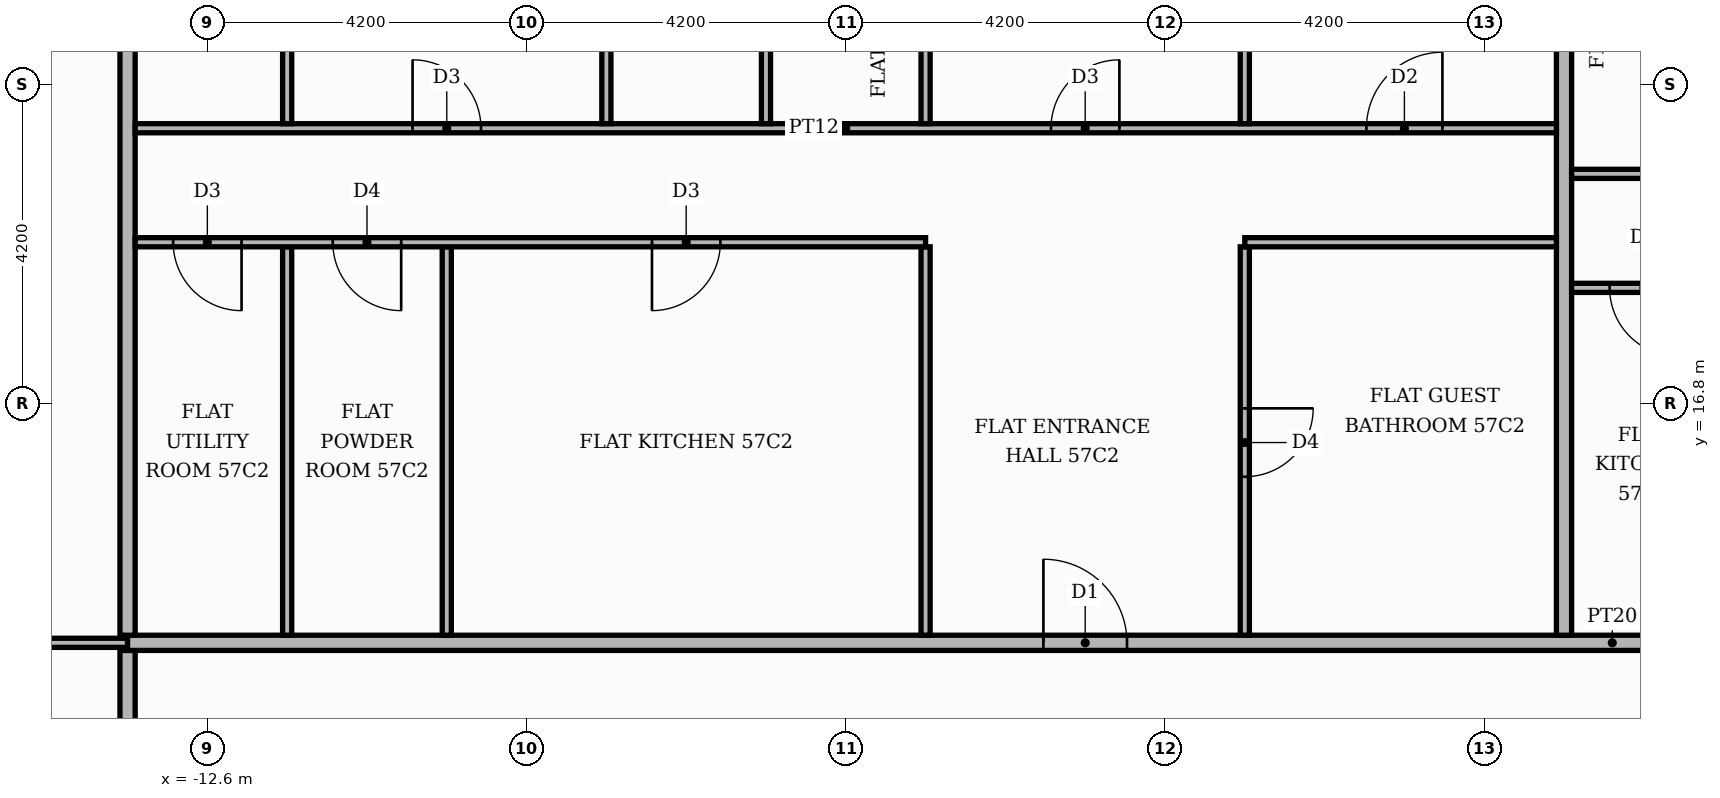
"""IFC4 building model, lengths in metres.
Left out: names, types, materials, properties, quantities, classifications, styles, units other than length and angle.
Written with IfcOpenShell. Run it as: python <this file> out.ifc"""

import sys

from ifc_helpers import new_model, si_unit, direction, frame, frame_2d, origin, place, context, subcontext, project, spatial, rectangle, extrude, element, fill, save


model = new_model("IFC4")
c1 = context("Model", 3, precision=1e-05, world=origin(), true_north=direction((0.0, 1.0)))
c2 = subcontext(c1, "Body", "Model", "MODEL_VIEW")
j1 = project(units=[si_unit("LENGTHUNIT", "METRE"), si_unit("PLANEANGLEUNIT", "RADIAN")], contexts=[c1])
p1 = place(None, origin())
s1 = spatial("IfcSite", under=j1, at=p1, CompositionType="ELEMENT")
p2 = place(p1, origin())
s2 = spatial("IfcBuilding", under=s1, at=p2, CompositionType="ELEMENT")
p3 = place(p2, frame((0.0, 0.0, 240.6)))
s3 = spatial("IfcBuildingStorey", under=s2, at=p3, CompositionType="ELEMENT", Elevation=240.6)
p4 = place(p3, frame((-13.65, 11.1, 0.0), z_axis=(0.0, 0.0, 1.0), x_axis=(0.0, 1.0, 0.0)))
e1 = element("IfcWall", 1, at=p4, inside=s3, PredefinedType="PARTITIONING", context=c2, shape_type="SweptSolid", body=[
    extrude(rectangle(XDim=2.45, YDim=0.2, at=frame_2d((1.225, 0.0))), origin(), (0.0, 0.0, 1.0), 3.48),
])
p5 = place(p3, frame((-19.82, 13.65, 0.0), z_axis=(0.0, 0.0, 1.0), x_axis=(1.0, 0.0, 0.0)))
e2 = element("IfcWall", 2, at=p5, inside=s3, PredefinedType="PARTITIONING", context=c2, shape_type="SweptSolid", body=[
    extrude(rectangle(XDim=6.17, YDim=0.12, at=frame_2d((3.085, 0.0))), origin(), (0.0, 0.0, 1.0), 3.48),
])
p6 = place(p5, frame((2.635, 0.0, 0.0)))
e3 = element("IfcOpeningElement", 3, at=p6, cuts=e2, PredefinedType="OPENING", context=c2, shape_type="SweptSolid", body=[
    extrude(rectangle(XDim=0.9, YDim=2.1, at=frame_2d((0.45, 1.05))), frame((0.0, 0.07, 0.0), z_axis=(0.0, -1.0, 0.0), x_axis=(1.0, 0.0, 0.0)), (0.0, 0.0, 1.0), 0.14),
])
p7 = place(p3, frame((-13.65, 13.65, 0.0), z_axis=(0.0, 0.0, 1.0), x_axis=(1.0, 0.0, 0.0)))
e4 = element("IfcWall", 4, at=p7, inside=s3, PredefinedType="PARTITIONING", context=c2, shape_type="SweptSolid", body=[
    extrude(rectangle(XDim=39.07, YDim=0.2, at=frame_2d((19.535, 0.0))), origin(), (0.0, 0.0, 1.0), 3.48),
])
p8 = place(p7, frame((24.65, 0.0, 0.0)))
e5 = element("IfcOpeningElement", 5, at=p8, cuts=e4, PredefinedType="OPENING", context=c2, shape_type="SweptSolid", body=[
    extrude(rectangle(XDim=1.1, YDim=2.4, at=frame_2d((0.55, 1.2))), frame((0.0, 0.11, 0.0), z_axis=(0.0, -1.0, 0.0), x_axis=(1.0, 0.0, 0.0)), (0.0, 0.0, 1.0), 0.22),
])
p9 = place(p7, frame((12.05, 0.0, 0.0)))
e6 = element("IfcOpeningElement", 6, at=p9, cuts=e4, PredefinedType="OPENING", context=c2, shape_type="SweptSolid", body=[
    extrude(rectangle(XDim=1.1, YDim=2.4, at=frame_2d((0.55, 1.2))), frame((0.0, 0.11, 0.0), z_axis=(0.0, -1.0, 0.0), x_axis=(1.0, 0.0, 0.0)), (0.0, 0.0, 1.0), 0.22),
])
p10 = place(p3, frame((-13.65, 13.75, 0.0), z_axis=(0.0, 0.0, 1.0), x_axis=(0.0, 1.0, 0.0)))
e7 = element("IfcWall", 7, at=p10, inside=s3, PredefinedType="PARTITIONING", context=c2, shape_type="SweptSolid", body=[
    extrude(rectangle(XDim=11.67, YDim=0.2, at=frame_2d((5.835, 0.0))), origin(), (0.0, 0.0, 1.0), 3.48),
])
for number, where, z_axis, x_axis in (
    (8, (-11.55, 13.75, 0.0), (0.0, 0.0, 1.0), (0.0, 1.0, 0.0)),
    (9, (-9.45, 13.75, 0.0), (0.0, 0.0, 1.0), (0.0, 1.0, 0.0)),
    (10, (-3.15, 13.75, 0.0), (0.0, 0.0, 1.0), (0.0, 1.0, 0.0)),
):
    element("IfcWall", number, at=place(p3, frame(where, z_axis=z_axis, x_axis=x_axis)), inside=s3, PredefinedType="PARTITIONING", context=c2, shape_type="SweptSolid", body=[
        extrude(rectangle(XDim=5.11, YDim=0.12, at=frame_2d((2.555, 0.0))), origin(), (0.0, 0.0, 1.0), 3.48),
    ])
p11 = place(p3, frame((1.05, 13.75, 0.0), z_axis=(0.0, 0.0, 1.0), x_axis=(0.0, 1.0, 0.0)))
e11 = element("IfcWall", 11, at=p11, inside=s3, PredefinedType="PARTITIONING", context=c2, shape_type="SweptSolid", body=[
    extrude(rectangle(XDim=5.11, YDim=0.12, at=frame_2d((2.555, 0.0))), origin(), (0.0, 0.0, 1.0), 3.48),
])
p12 = place(p11, frame((2.085, 0.0, 0.0)))
e12 = element("IfcOpeningElement", 12, at=p12, cuts=e11, PredefinedType="OPENING", context=c2, shape_type="SweptSolid", body=[
    extrude(rectangle(XDim=0.9, YDim=2.1, at=frame_2d((0.45, 1.05))), frame((0.0, 0.07, 0.0), z_axis=(0.0, -1.0, 0.0), x_axis=(1.0, 0.0, 0.0)), (0.0, 0.0, 1.0), 0.14),
])
p13 = place(p3, frame((5.25, 13.75, 0.0), z_axis=(0.0, 0.0, 1.0), x_axis=(0.0, 1.0, 0.0)))
e13 = element("IfcWall", 13, at=p13, inside=s3, PredefinedType="PARTITIONING", context=c2, shape_type="SweptSolid", body=[
    extrude(rectangle(XDim=11.67, YDim=0.2, at=frame_2d((5.835, 0.0))), origin(), (0.0, 0.0, 1.0), 3.48),
])
p14 = place(p3, frame((5.35, 18.32, 0.0), z_axis=(0.0, 0.0, 1.0), x_axis=(1.0, 0.0, 0.0)))
e14 = element("IfcWall", 14, at=p14, inside=s3, PredefinedType="PARTITIONING", context=c2, shape_type="SweptSolid", body=[
    extrude(rectangle(XDim=4.1, YDim=0.12, at=frame_2d((2.05, 0.0))), origin(), (0.0, 0.0, 1.0), 3.48),
])
p15 = place(p14, frame((0.5, 0.0, 0.0)))
e15 = element("IfcOpeningElement", 15, at=p15, cuts=e14, PredefinedType="OPENING", context=c2, shape_type="SweptSolid", body=[
    extrude(rectangle(XDim=0.9, YDim=2.1, at=frame_2d((0.45, 1.05))), frame((0.0, 0.07, 0.0), z_axis=(0.0, -1.0, 0.0), x_axis=(1.0, 0.0, 0.0)), (0.0, 0.0, 1.0), 0.14),
])
p16 = place(p3, frame((-13.55, 18.92, 0.0), z_axis=(0.0, 0.0, 1.0), x_axis=(1.0, 0.0, 0.0)))
e16 = element("IfcWall", 16, at=p16, inside=s3, PredefinedType="PARTITIONING", context=c2, shape_type="SweptSolid", body=[
    extrude(rectangle(XDim=10.4, YDim=0.12, at=frame_2d((5.2, 0.0))), origin(), (0.0, 0.0, 1.0), 3.48),
])
p17 = place(p16, frame((6.8, 0.0, 0.0)))
e17 = element("IfcOpeningElement", 17, at=p17, cuts=e16, PredefinedType="OPENING", context=c2, shape_type="SweptSolid", body=[
    extrude(rectangle(XDim=0.9, YDim=2.1, at=frame_2d((0.45, 1.05))), frame((0.0, 0.07, 0.0), z_axis=(0.0, -1.0, 0.0), x_axis=(1.0, 0.0, 0.0)), (0.0, 0.0, 1.0), 0.14),
])
p18 = place(p16, frame((2.6, 0.0, 0.0)))
e18 = element("IfcOpeningElement", 18, at=p18, cuts=e16, PredefinedType="OPENING", context=c2, shape_type="SweptSolid", body=[
    extrude(rectangle(XDim=0.9, YDim=2.1, at=frame_2d((0.45, 1.05))), frame((0.0, 0.07, 0.0), z_axis=(0.0, -1.0, 0.0), x_axis=(1.0, 0.0, 0.0)), (0.0, 0.0, 1.0), 0.14),
])
p19 = place(p16, frame((0.5, 0.0, 0.0)))
e19 = element("IfcOpeningElement", 19, at=p19, cuts=e16, PredefinedType="OPENING", context=c2, shape_type="SweptSolid", body=[
    extrude(rectangle(XDim=0.9, YDim=2.1, at=frame_2d((0.45, 1.05))), frame((0.0, 0.07, 0.0), z_axis=(0.0, -1.0, 0.0), x_axis=(1.0, 0.0, 0.0)), (0.0, 0.0, 1.0), 0.14),
])
p20 = place(p3, frame((1.05, 18.92, 0.0), z_axis=(0.0, 0.0, 1.0), x_axis=(1.0, 0.0, 0.0)))
e20 = element("IfcWall", 20, at=p20, inside=s3, PredefinedType="PARTITIONING", context=c2, shape_type="SweptSolid", body=[
    extrude(rectangle(XDim=4.1, YDim=0.12, at=frame_2d((2.05, 0.0))), origin(), (0.0, 0.0, 1.0), 3.48),
])
p21 = place(p3, frame((5.35, 19.82, 0.0), z_axis=(0.0, 0.0, 1.0), x_axis=(1.0, 0.0, 0.0)))
e21 = element("IfcWall", 21, at=p21, inside=s3, PredefinedType="PARTITIONING", context=c2, shape_type="SweptSolid", body=[
    extrude(rectangle(XDim=12.35, YDim=0.12, at=frame_2d((6.175, 0.0))), origin(), (0.0, 0.0, 1.0), 3.48),
])
p22 = place(p21, frame((8.85, 0.0, 0.0)))
e22 = element("IfcOpeningElement", 22, at=p22, cuts=e21, PredefinedType="OPENING", context=c2, shape_type="SweptSolid", body=[
    extrude(rectangle(XDim=1.0, YDim=2.1, at=frame_2d((0.5, 1.05))), frame((0.0, 0.07, 0.0), z_axis=(0.0, -1.0, 0.0), x_axis=(1.0, 0.0, 0.0)), (0.0, 0.0, 1.0), 0.14),
])
p23 = place(p21, frame((5.75, 0.0, 0.0)))
e23 = element("IfcOpeningElement", 23, at=p23, cuts=e21, PredefinedType="OPENING", context=c2, shape_type="SweptSolid", body=[
    extrude(rectangle(XDim=0.9, YDim=2.1, at=frame_2d((0.45, 1.05))), frame((0.0, 0.07, 0.0), z_axis=(0.0, -1.0, 0.0), x_axis=(1.0, 0.0, 0.0)), (0.0, 0.0, 1.0), 0.14),
])
p24 = place(p3, frame((-13.55, 20.42, 0.0), z_axis=(0.0, 0.0, 1.0), x_axis=(1.0, 0.0, 0.0)))
e24 = element("IfcWall", 24, at=p24, inside=s3, PredefinedType="PARTITIONING", context=c2, shape_type="SweptSolid", body=[
    extrude(rectangle(XDim=18.7, YDim=0.12, at=frame_2d((9.35, 0.0))), origin(), (0.0, 0.0, 1.0), 3.48),
])
p25 = place(p24, frame((16.2, 0.0, 0.0)))
e25 = element("IfcOpeningElement", 25, at=p25, cuts=e24, PredefinedType="OPENING", context=c2, shape_type="SweptSolid", body=[
    extrude(rectangle(XDim=1.0, YDim=2.1, at=frame_2d((0.5, 1.05))), frame((0.0, 0.07, 0.0), z_axis=(0.0, -1.0, 0.0), x_axis=(1.0, 0.0, 0.0)), (0.0, 0.0, 1.0), 0.14),
])
p26 = place(p24, frame((12.05, 0.0, 0.0)))
e26 = element("IfcOpeningElement", 26, at=p26, cuts=e24, PredefinedType="OPENING", context=c2, shape_type="SweptSolid", body=[
    extrude(rectangle(XDim=0.9, YDim=2.1, at=frame_2d((0.45, 1.05))), frame((0.0, 0.07, 0.0), z_axis=(0.0, -1.0, 0.0), x_axis=(1.0, 0.0, 0.0)), (0.0, 0.0, 1.0), 0.14),
])
p27 = place(p24, frame((3.65, 0.0, 0.0)))
e27 = element("IfcOpeningElement", 27, at=p27, cuts=e24, PredefinedType="OPENING", context=c2, shape_type="SweptSolid", body=[
    extrude(rectangle(XDim=0.9, YDim=2.1, at=frame_2d((0.45, 1.05))), frame((0.0, 0.07, 0.0), z_axis=(0.0, -1.0, 0.0), x_axis=(1.0, 0.0, 0.0)), (0.0, 0.0, 1.0), 0.14),
])
p28 = place(p3, frame((-11.55, 20.48, 0.0), z_axis=(0.0, 0.0, 1.0), x_axis=(0.0, 1.0, 0.0)))
e28 = element("IfcWall", 28, at=p28, inside=s3, PredefinedType="PARTITIONING", context=c2, shape_type="SweptSolid", body=[
    extrude(rectangle(XDim=4.94, YDim=0.12, at=frame_2d((2.47, 0.0))), origin(), (0.0, 0.0, 1.0), 3.48),
])
p29 = place(p28, frame((2.14, 0.0, 0.0)))
e29 = element("IfcOpeningElement", 29, at=p29, cuts=e28, PredefinedType="OPENING", context=c2, shape_type="SweptSolid", body=[
    extrude(rectangle(XDim=0.9, YDim=2.1, at=frame_2d((0.45, 1.05))), frame((0.0, 0.07, 0.0), z_axis=(0.0, -1.0, 0.0), x_axis=(1.0, 0.0, 0.0)), (0.0, 0.0, 1.0), 0.14),
])
p30 = place(p3, frame((-7.35, 20.48, 0.0), z_axis=(0.0, 0.0, 1.0), x_axis=(0.0, 1.0, 0.0)))
e30 = element("IfcWall", 30, at=p30, inside=s3, PredefinedType="PARTITIONING", context=c2, shape_type="SweptSolid", body=[
    extrude(rectangle(XDim=4.94, YDim=0.12, at=frame_2d((2.47, 0.0))), origin(), (0.0, 0.0, 1.0), 3.48),
])
p31 = place(p3, frame((-5.25, 20.48, 0.0), z_axis=(0.0, 0.0, 1.0), x_axis=(0.0, 1.0, 0.0)))
e31 = element("IfcWall", 31, at=p31, inside=s3, PredefinedType="PARTITIONING", context=c2, shape_type="SweptSolid", body=[
    extrude(rectangle(XDim=4.94, YDim=0.12, at=frame_2d((2.47, 0.0))), origin(), (0.0, 0.0, 1.0), 3.48),
])
p32 = place(p31, frame((2.14, 0.0, 0.0)))
e32 = element("IfcOpeningElement", 32, at=p32, cuts=e31, PredefinedType="OPENING", context=c2, shape_type="SweptSolid", body=[
    extrude(rectangle(XDim=0.9, YDim=2.1, at=frame_2d((0.45, 1.05))), frame((0.0, 0.07, 0.0), z_axis=(0.0, -1.0, 0.0), x_axis=(1.0, 0.0, 0.0)), (0.0, 0.0, 1.0), 0.14),
])
p33 = place(p3, frame((-3.15, 20.48, 0.0), z_axis=(0.0, 0.0, 1.0), x_axis=(0.0, 1.0, 0.0)))
e33 = element("IfcWall", 33, at=p33, inside=s3, PredefinedType="PARTITIONING", context=c2, shape_type="SweptSolid", body=[
    extrude(rectangle(XDim=4.94, YDim=0.12, at=frame_2d((2.47, 0.0))), origin(), (0.0, 0.0, 1.0), 3.48),
])
p34 = place(p33, frame((2.14, 0.0, 0.0)))
e34 = element("IfcOpeningElement", 34, at=p34, cuts=e33, PredefinedType="OPENING", context=c2, shape_type="SweptSolid", body=[
    extrude(rectangle(XDim=0.9, YDim=2.1, at=frame_2d((0.45, 1.05))), frame((0.0, 0.07, 0.0), z_axis=(0.0, -1.0, 0.0), x_axis=(1.0, 0.0, 0.0)), (0.0, 0.0, 1.0), 0.14),
])
p35 = place(p3, frame((1.05, 20.48, 0.0), z_axis=(0.0, 0.0, 1.0), x_axis=(0.0, 1.0, 0.0)))
e35 = element("IfcWall", 35, at=p35, inside=s3, PredefinedType="PARTITIONING", context=c2, shape_type="SweptSolid", body=[
    extrude(rectangle(XDim=4.94, YDim=0.12, at=frame_2d((2.47, 0.0))), origin(), (0.0, 0.0, 1.0), 3.48),
])
p36 = place(p15, frame((0.9, 0.0, 0.0), z_axis=(0.0, 0.0, 1.0), x_axis=(-1.0, 0.0, 0.0)))
e36 = element("IfcDoor", 36, at=p36, inside=s3, OperationType="SINGLE_SWING_RIGHT", PredefinedType="DOOR", context=c2, shape_type="SweptSolid", body=[
    extrude(rectangle(XDim=0.9, YDim=2.1, at=frame_2d((0.45, 1.05))), frame((0.0, 0.025, 0.0), z_axis=(0.0, -1.0, 0.0), x_axis=(1.0, 0.0, 0.0)), (0.0, 0.0, 1.0), 0.05),
])
fill(e15, e36)
p37 = place(p9, origin())
e37 = element("IfcDoor", 37, at=p37, inside=s3, OperationType="SINGLE_SWING_LEFT", PredefinedType="DOOR", context=c2, shape_type="SweptSolid", body=[
    extrude(rectangle(XDim=1.1, YDim=2.4, at=frame_2d((0.55, 1.2))), frame((0.0, 0.025, 0.0), z_axis=(0.0, -1.0, 0.0), x_axis=(1.0, 0.0, 0.0)), (0.0, 0.0, 1.0), 0.05),
])
fill(e6, e37)
p38 = place(p12, frame((0.9, 0.0, 0.0), z_axis=(0.0, 0.0, 1.0), x_axis=(-1.0, 0.0, 0.0)))
e38 = element("IfcDoor", 38, at=p38, inside=s3, OperationType="SINGLE_SWING_RIGHT", PredefinedType="DOOR", context=c2, shape_type="SweptSolid", body=[
    extrude(rectangle(XDim=0.9, YDim=2.1, at=frame_2d((0.45, 1.05))), frame((0.0, 0.025, 0.0), z_axis=(0.0, -1.0, 0.0), x_axis=(1.0, 0.0, 0.0)), (0.0, 0.0, 1.0), 0.05),
])
fill(e12, e38)
p39 = place(p17, frame((0.9, 0.0, 0.0), z_axis=(0.0, 0.0, 1.0), x_axis=(-1.0, 0.0, 0.0)))
e39 = element("IfcDoor", 39, at=p39, inside=s3, OperationType="SINGLE_SWING_LEFT", PredefinedType="DOOR", context=c2, shape_type="SweptSolid", body=[
    extrude(rectangle(XDim=0.9, YDim=2.1, at=frame_2d((0.45, 1.05))), frame((0.0, 0.025, 0.0), z_axis=(0.0, -1.0, 0.0), x_axis=(1.0, 0.0, 0.0)), (0.0, 0.0, 1.0), 0.05),
])
fill(e17, e39)
p40 = place(p18, frame((0.9, 0.0, 0.0), z_axis=(0.0, 0.0, 1.0), x_axis=(-1.0, 0.0, 0.0)))
e40 = element("IfcDoor", 40, at=p40, inside=s3, OperationType="SINGLE_SWING_RIGHT", PredefinedType="DOOR", context=c2, shape_type="SweptSolid", body=[
    extrude(rectangle(XDim=0.9, YDim=2.1, at=frame_2d((0.45, 1.05))), frame((0.0, 0.025, 0.0), z_axis=(0.0, -1.0, 0.0), x_axis=(1.0, 0.0, 0.0)), (0.0, 0.0, 1.0), 0.05),
])
fill(e18, e40)
p41 = place(p19, frame((0.9, 0.0, 0.0), z_axis=(0.0, 0.0, 1.0), x_axis=(-1.0, 0.0, 0.0)))
e41 = element("IfcDoor", 41, at=p41, inside=s3, OperationType="SINGLE_SWING_RIGHT", PredefinedType="DOOR", context=c2, shape_type="SweptSolid", body=[
    extrude(rectangle(XDim=0.9, YDim=2.1, at=frame_2d((0.45, 1.05))), frame((0.0, 0.025, 0.0), z_axis=(0.0, -1.0, 0.0), x_axis=(1.0, 0.0, 0.0)), (0.0, 0.0, 1.0), 0.05),
])
fill(e19, e41)
p42 = place(p25, origin())
e42 = element("IfcDoor", 42, at=p42, inside=s3, OperationType="SINGLE_SWING_RIGHT", PredefinedType="DOOR", context=c2, shape_type="SweptSolid", body=[
    extrude(rectangle(XDim=1.0, YDim=2.1, at=frame_2d((0.5, 1.05))), frame((0.0, 0.025, 0.0), z_axis=(0.0, -1.0, 0.0), x_axis=(1.0, 0.0, 0.0)), (0.0, 0.0, 1.0), 0.05),
])
fill(e25, e42)
p43 = place(p26, origin())
e43 = element("IfcDoor", 43, at=p43, inside=s3, OperationType="SINGLE_SWING_RIGHT", PredefinedType="DOOR", context=c2, shape_type="SweptSolid", body=[
    extrude(rectangle(XDim=0.9, YDim=2.1, at=frame_2d((0.45, 1.05))), frame((0.0, 0.025, 0.0), z_axis=(0.0, -1.0, 0.0), x_axis=(1.0, 0.0, 0.0)), (0.0, 0.0, 1.0), 0.05),
])
fill(e26, e43)
p44 = place(p27, origin())
e44 = element("IfcDoor", 44, at=p44, inside=s3, OperationType="SINGLE_SWING_LEFT", PredefinedType="DOOR", context=c2, shape_type="SweptSolid", body=[
    extrude(rectangle(XDim=0.9, YDim=2.1, at=frame_2d((0.45, 1.05))), frame((0.0, 0.025, 0.0), z_axis=(0.0, -1.0, 0.0), x_axis=(1.0, 0.0, 0.0)), (0.0, 0.0, 1.0), 0.05),
])
fill(e27, e44)
save(model, sys.argv[1])
